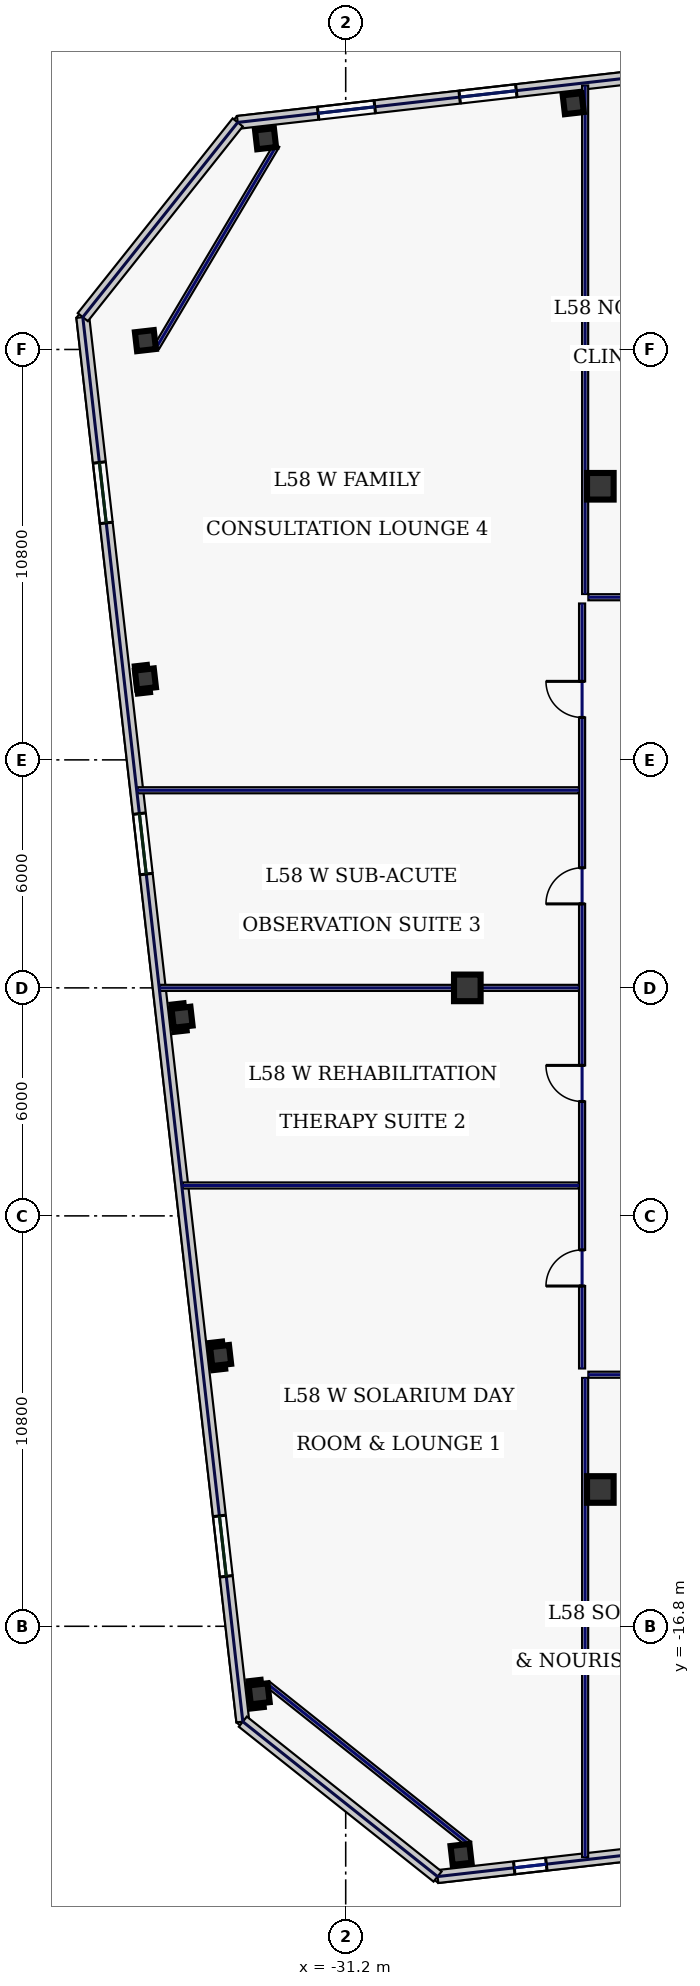
"""IFC4 building model, lengths in metres.
Left out: names, types, materials, properties, quantities, classifications, styles, units other than length and angle.
Written with IfcOpenShell. Run it as: python <this file> out.ifc"""

import sys

from ifc_helpers import new_model, si_unit, direction, frame, frame_2d, origin, origin_2d, place, context, subcontext, project, spatial, rectangle, hollow_rectangle, extrude, element, fill, save


model = new_model("IFC4")
c1 = context("Model", 3, precision=1e-05, world=origin(), true_north=direction((0.0, 1.0)))
c2 = subcontext(c1, "Body", "Model", "MODEL_VIEW")
j1 = project(units=[si_unit("LENGTHUNIT", "METRE"), si_unit("PLANEANGLEUNIT", "RADIAN")], contexts=[c1])
p1 = place(None, origin())
s1 = spatial("IfcSite", under=j1, at=p1, CompositionType="ELEMENT")
p2 = place(p1, origin())
s2 = spatial("IfcBuilding", under=s1, at=p2, CompositionType="ELEMENT")
p3 = place(p2, frame((0.0, 0.0, 251.0)))
s3 = spatial("IfcBuildingStorey", under=s2, at=p3, CompositionType="ELEMENT", Elevation=251.0)
for number, where, z_axis, x_axis in (
    (1, (-24.5, -13.2, 0.0), (0.0, 0.0, 1.0), (1.0, 0.0, 0.0)),
    (2, (-24.5, 13.2, 0.0), (0.0, 0.0, 1.0), (1.0, 0.0, 0.0)),
    (3, (-28.0, 0.0, 0.0), (0.0, 0.0, 1.0), (1.0, 0.0, 0.0)),
):
    element("IfcColumn", number, at=place(p3, frame(where, z_axis=z_axis, x_axis=x_axis)), inside=s3, PredefinedType="COLUMN", context=c2, shape_type="SweptSolid", body=[
        extrude(hollow_rectangle(XDim=0.7, YDim=0.7, WallThickness=0.032, at=origin_2d()), origin(), (0.0, 0.0, 1.0), 3.74),
    ])
for number, where, z_axis, x_axis in (
    (4, (-28.165, -22.802, 0.0), (0.0, 0.0, 1.0), (0.994, 0.113, 0.0)),
    (5, (-25.212, 23.268, 0.0), (0.0, 0.0, 1.0), (0.994, 0.113, 0.0)),
    (6, (-33.309, 22.345, 0.0), (0.0, 0.0, 1.0), (0.994, 0.113, 0.0)),
    (7, (-36.47, 17.033, 0.0), (0.0, 0.0, 1.0), (0.994, 0.113, 0.0)),
    (8, (-36.47, 8.131, 0.0), (0.0, 0.0, 1.0), (0.994, 0.113, 0.0)),
    (9, (-35.506, -0.772, 0.0), (0.0, 0.0, 1.0), (0.994, 0.113, 0.0)),
    (10, (-34.491, -9.674, 0.0), (0.0, 0.0, 1.0), (0.994, 0.113, 0.0)),
    (11, (-33.477, -18.577, 0.0), (0.0, 0.0, 1.0), (0.994, 0.113, 0.0)),
):
    element("IfcColumn", number, at=place(p3, frame(where, z_axis=z_axis, x_axis=x_axis)), inside=s3, PredefinedType="COLUMN", context=c2, shape_type="SweptSolid", body=[
        extrude(hollow_rectangle(XDim=0.5, YDim=0.5, WallThickness=0.025, at=origin_2d()), origin(), (0.0, 0.0, 1.0), 3.74),
    ])
p4 = place(p3, frame((-28.783, -23.386, 0.0), z_axis=(0.0, 0.0, 1.0), x_axis=(0.993572271362, 0.113199565282, 0.0)))
e12 = element("IfcWall", 12, at=p4, inside=s3, PredefinedType="STANDARD", context=c2, shape_type="SweptSolid", body=[
    extrude(rectangle(XDim=18.651, YDim=0.34, at=frame_2d((9.326, 0.0))), origin(), (0.0, 0.0, 1.0), 3.74),
])
p5 = place(p4, frame((2.03, 0.0, 0.88)))
e13 = element("IfcOpeningElement", 13, at=p5, cuts=e12, PredefinedType="OPENING", context=c2, shape_type="SweptSolid", body=[
    extrude(rectangle(XDim=0.85, YDim=1.85, at=frame_2d((0.425, 0.925))), frame((0.0, 0.18, 0.0), z_axis=(0.0, -1.0, 0.0), x_axis=(1.0, 0.0, 0.0)), (0.0, 0.0, 1.0), 0.36),
])
p6 = place(p4, frame((5.779, 0.0, 0.88)))
e14 = element("IfcOpeningElement", 14, at=p6, cuts=e12, PredefinedType="OPENING", context=c2, shape_type="SweptSolid", body=[
    extrude(rectangle(XDim=1.7, YDim=1.95, at=frame_2d((0.85, 0.975))), frame((0.0, 0.18, 0.0), z_axis=(0.0, -1.0, 0.0), x_axis=(1.0, 0.0, 0.0)), (0.0, 0.0, 1.0), 0.36),
])
p7 = place(p4, frame((10.179, 0.0, 0.88)))
e15 = element("IfcOpeningElement", 15, at=p7, cuts=e12, PredefinedType="OPENING", context=c2, shape_type="SweptSolid", body=[
    extrude(rectangle(XDim=1.7, YDim=1.95, at=frame_2d((0.85, 0.975))), frame((0.0, 0.18, 0.0), z_axis=(0.0, -1.0, 0.0), x_axis=(1.0, 0.0, 0.0)), (0.0, 0.0, 1.0), 0.36),
])
p8 = place(p4, frame((13.927, 0.0, 0.88)))
e16 = element("IfcOpeningElement", 16, at=p8, cuts=e12, PredefinedType="OPENING", context=c2, shape_type="SweptSolid", body=[
    extrude(rectangle(XDim=1.7, YDim=1.95, at=frame_2d((0.85, 0.975))), frame((0.0, 0.18, 0.0), z_axis=(0.0, -1.0, 0.0), x_axis=(1.0, 0.0, 0.0)), (0.0, 0.0, 1.0), 0.36),
])
p9 = place(p3, frame((-15.51, 24.886, 0.0), z_axis=(0.0, 0.0, 1.0), x_axis=(-0.993572271362, -0.113199565282, 0.0)))
e17 = element("IfcWall", 17, at=p9, inside=s3, PredefinedType="STANDARD", context=c2, shape_type="SweptSolid", body=[
    extrude(rectangle(XDim=18.651, YDim=0.34, at=frame_2d((9.326, 0.0))), origin(), (0.0, 0.0, 1.0), 3.74),
])
p10 = place(p9, frame((15.021, 0.0, 0.83)))
e18 = element("IfcOpeningElement", 18, at=p10, cuts=e17, PredefinedType="OPENING", context=c2, shape_type="SweptSolid", body=[
    extrude(rectangle(XDim=1.5, YDim=2.0, at=frame_2d((0.75, 1.0))), frame((0.0, 0.18, 0.0), z_axis=(0.0, -1.0, 0.0), x_axis=(1.0, 0.0, 0.0)), (0.0, 0.0, 1.0), 0.36),
])
p11 = place(p9, frame((11.273, 0.0, 0.83)))
e19 = element("IfcOpeningElement", 19, at=p11, cuts=e17, PredefinedType="OPENING", context=c2, shape_type="SweptSolid", body=[
    extrude(rectangle(XDim=1.5, YDim=2.0, at=frame_2d((0.75, 1.0))), frame((0.0, 0.18, 0.0), z_axis=(0.0, -1.0, 0.0), x_axis=(1.0, 0.0, 0.0)), (0.0, 0.0, 1.0), 0.36),
])
p12 = place(p9, frame((6.873, 0.0, 0.83)))
e20 = element("IfcOpeningElement", 20, at=p12, cuts=e17, PredefinedType="OPENING", context=c2, shape_type="SweptSolid", body=[
    extrude(rectangle(XDim=1.5, YDim=2.0, at=frame_2d((0.75, 1.0))), frame((0.0, 0.18, 0.0), z_axis=(0.0, -1.0, 0.0), x_axis=(1.0, 0.0, 0.0)), (0.0, 0.0, 1.0), 0.36),
])
p13 = place(p9, frame((3.125, 0.0, 0.83)))
e21 = element("IfcOpeningElement", 21, at=p13, cuts=e17, PredefinedType="OPENING", context=c2, shape_type="SweptSolid", body=[
    extrude(rectangle(XDim=0.85, YDim=1.85, at=frame_2d((0.425, 0.925))), frame((0.0, 0.18, 0.0), z_axis=(0.0, -1.0, 0.0), x_axis=(1.0, 0.0, 0.0)), (0.0, 0.0, 1.0), 0.36),
])
p14 = place(p3, frame((-38.118, 17.651, 0.0), z_axis=(0.0, 0.0, 1.0), x_axis=(0.11320360501, -0.9935718111, 0.0)))
e22 = element("IfcWall", 22, at=p14, inside=s3, PredefinedType="STANDARD", context=c2, shape_type="SweptSolid", body=[
    extrude(rectangle(XDim=37.2, YDim=0.34, at=frame_2d((18.6, 0.0))), origin(), (0.0, 0.0, 1.0), 3.74),
])
p15 = place(p14, frame((3.85, 0.0, 0.58)))
e23 = element("IfcOpeningElement", 23, at=p15, cuts=e22, PredefinedType="OPENING", context=c2, shape_type="SweptSolid", body=[
    extrude(rectangle(XDim=1.6, YDim=2.3, at=frame_2d((0.8, 1.15))), frame((0.0, 0.18, 0.0), z_axis=(0.0, -1.0, 0.0), x_axis=(1.0, 0.0, 0.0)), (0.0, 0.0, 1.0), 0.36),
])
p16 = place(p14, frame((13.15, 0.0, 0.58)))
e24 = element("IfcOpeningElement", 24, at=p16, cuts=e22, PredefinedType="OPENING", context=c2, shape_type="SweptSolid", body=[
    extrude(rectangle(XDim=1.6, YDim=2.3, at=frame_2d((0.8, 1.15))), frame((0.0, 0.18, 0.0), z_axis=(0.0, -1.0, 0.0), x_axis=(1.0, 0.0, 0.0)), (0.0, 0.0, 1.0), 0.36),
])
p17 = place(p14, frame((31.75, 0.0, 0.58)))
e25 = element("IfcOpeningElement", 25, at=p17, cuts=e22, PredefinedType="OPENING", context=c2, shape_type="SweptSolid", body=[
    extrude(rectangle(XDim=1.6, YDim=2.3, at=frame_2d((0.8, 1.15))), frame((0.0, 0.18, 0.0), z_axis=(0.0, -1.0, 0.0), x_axis=(1.0, 0.0, 0.0)), (0.0, 0.0, 1.0), 0.36),
])
for number, where, z_axis, x_axis in (
    (26, (-34.042, 22.775, 0.0), (0.0, 0.0, 1.0), (-0.623, -0.783, 0.0)),
    (27, (-33.907, -19.31, 0.0), (0.0, 0.0, 1.0), (0.783, -0.623, 0.0)),
):
    element("IfcWall", number, at=place(p3, frame(where, z_axis=z_axis, x_axis=x_axis)), inside=s3, PredefinedType="STANDARD", context=c2, shape_type="SweptSolid", body=[
        extrude(rectangle(XDim=6.548, YDim=0.34, at=frame_2d((3.274, 0.0))), origin(), (0.0, 0.0, 1.0), 3.74),
    ])
p18 = place(p3, frame((-33.016, 22.171, 0.0), z_axis=(0.0, 0.0, 1.0), x_axis=(-0.511385266265, -0.859351563359, 0.0)))
e28 = element("IfcWall", 28, at=p18, inside=s3, PredefinedType="PARTITIONING", context=c2, shape_type="SweptSolid", body=[
    extrude(rectangle(XDim=6.182, YDim=0.16, at=frame_2d((3.091, 0.0))), origin(), (0.0, 0.0, 1.0), 3.74),
])
p19 = place(p3, frame((-33.265, -18.311, 0.0), z_axis=(0.0, 0.0, 1.0), x_axis=(0.782602647064, -0.622521563328, 0.0)))
e29 = element("IfcWall", 29, at=p19, inside=s3, PredefinedType="PARTITIONING", context=c2, shape_type="SweptSolid", body=[
    extrude(rectangle(XDim=6.788, YDim=0.16, at=frame_2d((3.394, 0.0))), origin(), (0.0, 0.0, 1.0), 3.74),
])
p20 = place(p3, frame((-24.98, -10.015, 0.0), z_axis=(0.0, 0.0, 1.0), x_axis=(0.0, 1.0, 0.0)))
e30 = element("IfcWall", 30, at=p20, inside=s3, PredefinedType="PARTITIONING", context=c2, shape_type="SweptSolid", body=[
    extrude(rectangle(XDim=20.13, YDim=0.16, at=frame_2d((10.065, 0.0))), origin(), (0.0, 0.0, 1.0), 3.74),
])
p21 = place(p20, frame((2.169, 0.0, 0.0)))
e31 = element("IfcOpeningElement", 31, at=p21, cuts=e30, PredefinedType="OPENING", context=c2, shape_type="SweptSolid", body=[
    extrude(rectangle(XDim=0.95, YDim=2.2, at=frame_2d((0.475, 1.1))), frame((0.0, 0.09, 0.0), z_axis=(0.0, -1.0, 0.0), x_axis=(1.0, 0.0, 0.0)), (0.0, 0.0, 1.0), 0.18),
])
p22 = place(p20, frame((7.025, 0.0, 0.0)))
e32 = element("IfcOpeningElement", 32, at=p22, cuts=e30, PredefinedType="OPENING", context=c2, shape_type="SweptSolid", body=[
    extrude(rectangle(XDim=0.95, YDim=2.2, at=frame_2d((0.475, 1.1))), frame((0.0, 0.09, 0.0), z_axis=(0.0, -1.0, 0.0), x_axis=(1.0, 0.0, 0.0)), (0.0, 0.0, 1.0), 0.18),
])
p23 = place(p20, frame((12.225, 0.0, 0.0)))
e33 = element("IfcOpeningElement", 33, at=p23, cuts=e30, PredefinedType="OPENING", context=c2, shape_type="SweptSolid", body=[
    extrude(rectangle(XDim=0.95, YDim=2.2, at=frame_2d((0.475, 1.1))), frame((0.0, 0.09, 0.0), z_axis=(0.0, -1.0, 0.0), x_axis=(1.0, 0.0, 0.0)), (0.0, 0.0, 1.0), 0.18),
])
p24 = place(p20, frame((17.131, 0.0, 0.0)))
e34 = element("IfcOpeningElement", 34, at=p24, cuts=e30, PredefinedType="OPENING", context=c2, shape_type="SweptSolid", body=[
    extrude(rectangle(XDim=0.95, YDim=2.2, at=frame_2d((0.475, 1.1))), frame((0.0, 0.09, 0.0), z_axis=(0.0, -1.0, 0.0), x_axis=(1.0, 0.0, 0.0)), (0.0, 0.0, 1.0), 0.18),
])
p25 = place(p3, frame((-24.815, 10.28, 0.0), z_axis=(0.0, 0.0, 1.0), x_axis=(1.0, 0.0, 0.0)))
e35 = element("IfcWall", 35, at=p25, inside=s3, PredefinedType="PARTITIONING", context=c2, shape_type="SweptSolid", body=[
    extrude(rectangle(XDim=49.63, YDim=0.16, at=frame_2d((24.815, 0.0))), origin(), (0.0, 0.0, 1.0), 3.74),
])
p26 = place(p25, frame((1.869, 0.0, 0.0)))
e36 = element("IfcOpeningElement", 36, at=p26, cuts=e35, PredefinedType="OPENING", context=c2, shape_type="SweptSolid", body=[
    extrude(rectangle(XDim=1.3, YDim=2.2, at=frame_2d((0.65, 1.1))), frame((0.0, 0.09, 0.0), z_axis=(0.0, -1.0, 0.0), x_axis=(1.0, 0.0, 0.0)), (0.0, 0.0, 1.0), 0.18),
])
p27 = place(p25, frame((7.288, 0.0, 0.0)))
e37 = element("IfcOpeningElement", 37, at=p27, cuts=e35, PredefinedType="OPENING", context=c2, shape_type="SweptSolid", body=[
    extrude(rectangle(XDim=1.05, YDim=2.2, at=frame_2d((0.525, 1.1))), frame((0.0, 0.09, 0.0), z_axis=(0.0, -1.0, 0.0), x_axis=(1.0, 0.0, 0.0)), (0.0, 0.0, 1.0), 0.18),
])
p28 = place(p25, frame((12.887, 0.0, 0.0)))
e38 = element("IfcOpeningElement", 38, at=p28, cuts=e35, PredefinedType="OPENING", context=c2, shape_type="SweptSolid", body=[
    extrude(rectangle(XDim=1.3, YDim=2.2, at=frame_2d((0.65, 1.1))), frame((0.0, 0.09, 0.0), z_axis=(0.0, -1.0, 0.0), x_axis=(1.0, 0.0, 0.0)), (0.0, 0.0, 1.0), 0.18),
])
p29 = place(p25, frame((19.53, 0.0, 0.0)))
e39 = element("IfcOpeningElement", 39, at=p29, cuts=e35, PredefinedType="OPENING", context=c2, shape_type="SweptSolid", body=[
    extrude(rectangle(XDim=0.95, YDim=2.2, at=frame_2d((0.475, 1.1))), frame((0.0, 0.09, 0.0), z_axis=(0.0, -1.0, 0.0), x_axis=(1.0, 0.0, 0.0)), (0.0, 0.0, 1.0), 0.18),
])
p30 = place(p25, frame((27.383, 0.0, 0.0)))
e40 = element("IfcOpeningElement", 40, at=p30, cuts=e35, PredefinedType="OPENING", context=c2, shape_type="SweptSolid", body=[
    extrude(rectangle(XDim=0.95, YDim=2.2, at=frame_2d((0.475, 1.1))), frame((0.0, 0.09, 0.0), z_axis=(0.0, -1.0, 0.0), x_axis=(1.0, 0.0, 0.0)), (0.0, 0.0, 1.0), 0.18),
])
p31 = place(p25, frame((34.853, 0.0, 0.0)))
e41 = element("IfcOpeningElement", 41, at=p31, cuts=e35, PredefinedType="OPENING", context=c2, shape_type="SweptSolid", body=[
    extrude(rectangle(XDim=1.3, YDim=2.2, at=frame_2d((0.65, 1.1))), frame((0.0, 0.09, 0.0), z_axis=(0.0, -1.0, 0.0), x_axis=(1.0, 0.0, 0.0)), (0.0, 0.0, 1.0), 0.18),
])
p32 = place(p25, frame((41.475, 0.0, 0.0)))
e42 = element("IfcOpeningElement", 42, at=p32, cuts=e35, PredefinedType="OPENING", context=c2, shape_type="SweptSolid", body=[
    extrude(rectangle(XDim=1.3, YDim=2.2, at=frame_2d((0.65, 1.1))), frame((0.0, 0.09, 0.0), z_axis=(0.0, -1.0, 0.0), x_axis=(1.0, 0.0, 0.0)), (0.0, 0.0, 1.0), 0.18),
])
p33 = place(p25, frame((46.806, 0.0, 0.0)))
e43 = element("IfcOpeningElement", 43, at=p33, cuts=e35, PredefinedType="OPENING", context=c2, shape_type="SweptSolid", body=[
    extrude(rectangle(XDim=0.95, YDim=2.2, at=frame_2d((0.475, 1.1))), frame((0.0, 0.09, 0.0), z_axis=(0.0, -1.0, 0.0), x_axis=(1.0, 0.0, 0.0)), (0.0, 0.0, 1.0), 0.18),
])
p34 = place(p3, frame((-15.065, -10.18, 0.0), z_axis=(0.0, 0.0, 1.0), x_axis=(-1.0, 0.0, 0.0)))
e44 = element("IfcWall", 44, at=p34, inside=s3, PredefinedType="PARTITIONING", context=c2, shape_type="SweptSolid", body=[
    extrude(rectangle(XDim=9.75, YDim=0.16, at=frame_2d((4.875, 0.0))), origin(), (0.0, 0.0, 1.0), 3.74),
])
p35 = place(p34, frame((6.926, 0.0, 0.0)))
e45 = element("IfcOpeningElement", 45, at=p35, cuts=e44, PredefinedType="OPENING", context=c2, shape_type="SweptSolid", body=[
    extrude(rectangle(XDim=1.15, YDim=2.2, at=frame_2d((0.575, 1.1))), frame((0.0, 0.09, 0.0), z_axis=(0.0, -1.0, 0.0), x_axis=(1.0, 0.0, 0.0)), (0.0, 0.0, 1.0), 0.18),
])
p36 = place(p34, frame((2.179, 0.0, 0.0)))
e46 = element("IfcOpeningElement", 46, at=p36, cuts=e44, PredefinedType="OPENING", context=c2, shape_type="SweptSolid", body=[
    extrude(rectangle(XDim=1.45, YDim=2.2, at=frame_2d((0.725, 1.1))), frame((0.0, 0.09, 0.0), z_axis=(0.0, -1.0, 0.0), x_axis=(1.0, 0.0, 0.0)), (0.0, 0.0, 1.0), 0.18),
])
p37 = place(p3, frame((-24.9, 10.365, 0.0), z_axis=(0.0, 0.0, 1.0), x_axis=(0.0, 1.0, 0.0)))
e47 = element("IfcWall", 47, at=p37, inside=s3, PredefinedType="PARTITIONING", context=c2, shape_type="SweptSolid", body=[
    extrude(rectangle(XDim=13.381, YDim=0.16, at=frame_2d((6.691, 0.0))), origin(), (0.0, 0.0, 1.0), 3.285),
])
p38 = place(p3, frame((-24.9, -22.873, 0.0), z_axis=(0.0, 0.0, 1.0), x_axis=(0.0, 1.0, 0.0)))
e48 = element("IfcWall", 48, at=p38, inside=s3, PredefinedType="PARTITIONING", context=c2, shape_type="SweptSolid", body=[
    extrude(rectangle(XDim=12.608, YDim=0.16, at=frame_2d((6.304, 0.0))), origin(), (0.0, 0.0, 1.0), 3.74),
])
p39 = place(p3, frame((-35.494, -5.2, 0.0), z_axis=(0.0, 0.0, 1.0), x_axis=(1.0, 0.0, 0.0)))
e49 = element("IfcWall", 49, at=p39, inside=s3, PredefinedType="PARTITIONING", context=c2, shape_type="SweptSolid", body=[
    extrude(rectangle(XDim=10.429, YDim=0.16, at=frame_2d((5.215, 0.0))), origin(), (0.0, 0.0, 1.0), 3.74),
])
p40 = place(p3, frame((-36.087, 0.0, 0.0), z_axis=(0.0, 0.0, 1.0), x_axis=(1.0, 0.0, 0.0)))
e50 = element("IfcWall", 50, at=p40, inside=s3, PredefinedType="PARTITIONING", context=c2, shape_type="SweptSolid", body=[
    extrude(rectangle(XDim=11.022, YDim=0.16, at=frame_2d((5.511, 0.0))), origin(), (0.0, 0.0, 1.0), 3.285),
])
p41 = place(p3, frame((-36.679, 5.2, 0.0), z_axis=(0.0, 0.0, 1.0), x_axis=(1.0, 0.0, 0.0)))
e51 = element("IfcWall", 51, at=p41, inside=s3, PredefinedType="PARTITIONING", context=c2, shape_type="SweptSolid", body=[
    extrude(rectangle(XDim=11.615, YDim=0.16, at=frame_2d((5.807, 0.0))), origin(), (0.0, 0.0, 1.0), 3.74),
])
p42 = place(p5, origin())
e52 = element("IfcWindow", 52, at=p42, inside=s3, PartitioningType="SINGLE_PANEL", PredefinedType="WINDOW", context=c2, shape_type="SweptSolid", body=[
    extrude(rectangle(XDim=0.85, YDim=1.85, at=frame_2d((0.425, 0.925))), frame((0.0, 0.03, 0.0), z_axis=(0.0, -1.0, 0.0), x_axis=(1.0, 0.0, 0.0)), (0.0, 0.0, 1.0), 0.06),
])
fill(e13, e52)
p43 = place(p10, origin())
e53 = element("IfcWindow", 53, at=p43, inside=s3, PartitioningType="SINGLE_PANEL", PredefinedType="WINDOW", context=c2, shape_type="SweptSolid", body=[
    extrude(rectangle(XDim=1.5, YDim=2.0, at=frame_2d((0.75, 1.0))), frame((0.0, 0.03, 0.0), z_axis=(0.0, -1.0, 0.0), x_axis=(1.0, 0.0, 0.0)), (0.0, 0.0, 1.0), 0.06),
])
fill(e18, e53)
p44 = place(p11, origin())
e54 = element("IfcWindow", 54, at=p44, inside=s3, PartitioningType="SINGLE_PANEL", PredefinedType="WINDOW", context=c2, shape_type="SweptSolid", body=[
    extrude(rectangle(XDim=1.5, YDim=2.0, at=frame_2d((0.75, 1.0))), frame((0.0, 0.03, 0.0), z_axis=(0.0, -1.0, 0.0), x_axis=(1.0, 0.0, 0.0)), (0.0, 0.0, 1.0), 0.06),
])
fill(e19, e54)
p45 = place(p15, origin())
e55 = element("IfcWindow", 55, at=p45, inside=s3, PartitioningType="SINGLE_PANEL", PredefinedType="WINDOW", context=c2, shape_type="SweptSolid", body=[
    extrude(rectangle(XDim=1.6, YDim=2.3, at=frame_2d((0.8, 1.15))), frame((0.0, 0.03, 0.0), z_axis=(0.0, -1.0, 0.0), x_axis=(1.0, 0.0, 0.0)), (0.0, 0.0, 1.0), 0.06),
])
fill(e23, e55)
p46 = place(p16, origin())
e56 = element("IfcWindow", 56, at=p46, inside=s3, PartitioningType="SINGLE_PANEL", PredefinedType="WINDOW", context=c2, shape_type="SweptSolid", body=[
    extrude(rectangle(XDim=1.6, YDim=2.3, at=frame_2d((0.8, 1.15))), frame((0.0, 0.03, 0.0), z_axis=(0.0, -1.0, 0.0), x_axis=(1.0, 0.0, 0.0)), (0.0, 0.0, 1.0), 0.06),
])
fill(e24, e56)
p47 = place(p17, origin())
e57 = element("IfcWindow", 57, at=p47, inside=s3, PartitioningType="SINGLE_PANEL", PredefinedType="WINDOW", context=c2, shape_type="SweptSolid", body=[
    extrude(rectangle(XDim=1.6, YDim=2.3, at=frame_2d((0.8, 1.15))), frame((0.0, 0.03, 0.0), z_axis=(0.0, -1.0, 0.0), x_axis=(1.0, 0.0, 0.0)), (0.0, 0.0, 1.0), 0.06),
])
fill(e25, e57)
p48 = place(p21, origin())
e58 = element("IfcDoor", 58, at=p48, inside=s3, OperationType="SINGLE_SWING_LEFT", PredefinedType="DOOR", context=c2, shape_type="SweptSolid", body=[
    extrude(rectangle(XDim=0.95, YDim=2.2, at=frame_2d((0.475, 1.1))), frame((0.0, 0.025, 0.0), z_axis=(0.0, -1.0, 0.0), x_axis=(1.0, 0.0, 0.0)), (0.0, 0.0, 1.0), 0.05),
])
fill(e31, e58)
p49 = place(p22, origin())
e59 = element("IfcDoor", 59, at=p49, inside=s3, OperationType="SINGLE_SWING_RIGHT", PredefinedType="DOOR", context=c2, shape_type="SweptSolid", body=[
    extrude(rectangle(XDim=0.95, YDim=2.2, at=frame_2d((0.475, 1.1))), frame((0.0, 0.025, 0.0), z_axis=(0.0, -1.0, 0.0), x_axis=(1.0, 0.0, 0.0)), (0.0, 0.0, 1.0), 0.05),
])
fill(e32, e59)
p50 = place(p23, origin())
e60 = element("IfcDoor", 60, at=p50, inside=s3, OperationType="SINGLE_SWING_LEFT", PredefinedType="DOOR", context=c2, shape_type="SweptSolid", body=[
    extrude(rectangle(XDim=0.95, YDim=2.2, at=frame_2d((0.475, 1.1))), frame((0.0, 0.025, 0.0), z_axis=(0.0, -1.0, 0.0), x_axis=(1.0, 0.0, 0.0)), (0.0, 0.0, 1.0), 0.05),
])
fill(e33, e60)
p51 = place(p24, origin())
e61 = element("IfcDoor", 61, at=p51, inside=s3, OperationType="SINGLE_SWING_RIGHT", PredefinedType="DOOR", context=c2, shape_type="SweptSolid", body=[
    extrude(rectangle(XDim=0.95, YDim=2.2, at=frame_2d((0.475, 1.1))), frame((0.0, 0.025, 0.0), z_axis=(0.0, -1.0, 0.0), x_axis=(1.0, 0.0, 0.0)), (0.0, 0.0, 1.0), 0.05),
])
fill(e34, e61)
save(model, sys.argv[1])
